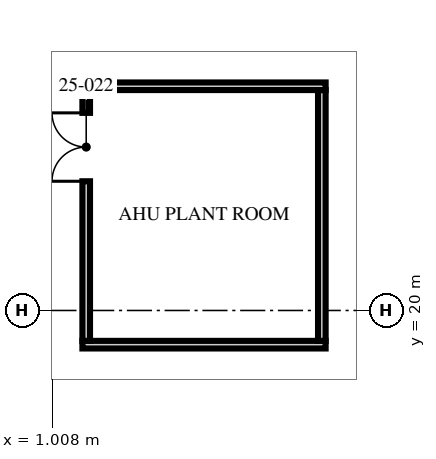
"""IFC4 building model, lengths in metres.
Left out: names, types, materials, properties, quantities, classifications, styles, units other than length and angle.
Written with IfcOpenShell. Run it as: python <this file> out.ifc"""

import sys

from ifc_helpers import new_model, si_unit, direction, frame, frame_2d, origin, origin_2d, place, context, subcontext, project, spatial, rectangle, hollow_rectangle, extrude, element, fill, save


model = new_model("IFC4")
c1 = context("Model", 3, precision=1e-05, world=origin(), true_north=direction((0.0, 1.0)))
c2 = subcontext(c1, "Body", "Model", "MODEL_VIEW")
j1 = project(units=[si_unit("LENGTHUNIT", "METRE"), si_unit("PLANEANGLEUNIT", "RADIAN")], contexts=[c1])
p1 = place(None, origin())
s1 = spatial("IfcSite", under=j1, at=p1, CompositionType="ELEMENT")
p2 = place(p1, origin())
s2 = spatial("IfcBuilding", under=s1, at=p2, CompositionType="ELEMENT")
p3 = place(p2, frame((0.0, 0.0, 99.75)))
s3 = spatial("IfcBuildingStorey", under=s2, at=p3, CompositionType="ELEMENT", Elevation=99.75)
p4 = place(p3, frame((0.0, 29.8, -0.65), z_axis=(0.0, -0.334765406017, 0.942301503201), x_axis=(1.0, 0.0, 0.0)))
e1 = element("IfcColumn", 1, at=p4, inside=s3, PredefinedType="COLUMN", context=c2, shape_type="SweptSolid", body=[
    extrude(hollow_rectangle(XDim=3.2, YDim=1.8, WallThickness=0.2, at=origin_2d()), origin(), (0.0, 0.0, 1.0), 8.065),
])
p5 = place(p3, frame((10.0, 29.8, -0.65), z_axis=(-0.103601510687, -0.332963994967, 0.937230870724), x_axis=(0.994618884766, -0.034712905596, 0.097612951251)))
e2 = element("IfcColumn", 2, at=p5, inside=s3, PredefinedType="COLUMN", context=c2, shape_type="SweptSolid", body=[
    extrude(hollow_rectangle(XDim=3.2, YDim=1.8, WallThickness=0.2, at=origin_2d()), origin(), (0.0, 0.0, 1.0), 8.109),
])
p6 = place(p3, frame((1.8, 19.1, 0.0), z_axis=(0.0, 0.0, 1.0), x_axis=(1.0, 0.0, 0.0)))
e3 = element("IfcWall", 3, at=p6, inside=s3, PredefinedType="SOLIDWALL", context=c2, shape_type="SweptSolid", body=[
    extrude(rectangle(XDim=6.4, YDim=0.2, at=frame_2d((3.2, 0.0))), origin(), (0.0, 0.0, 1.0), 6.46),
])
p7 = place(p3, frame((1.9, 19.2, 0.0), z_axis=(0.0, 0.0, 1.0), x_axis=(0.0, 1.0, 0.0)))
e4 = element("IfcWall", 4, at=p7, inside=s3, PredefinedType="SOLIDWALL", context=c2, shape_type="SweptSolid", body=[
    extrude(rectangle(XDim=6.6, YDim=0.2, at=frame_2d((3.3, 0.0))), origin(), (0.0, 0.0, 1.0), 7.25),
])
p8 = place(p7, frame((4.2, 0.0, 0.0)))
e5 = element("IfcOpeningElement", 5, at=p8, cuts=e4, PredefinedType="OPENING", context=c2, shape_type="SweptSolid", body=[
    extrude(rectangle(XDim=1.8, YDim=2.4, at=frame_2d((0.9, 1.2))), frame((0.0, 0.11, 0.0), z_axis=(0.0, -1.0, 0.0), x_axis=(1.0, 0.0, 0.0)), (0.0, 0.0, 1.0), 0.22),
])
p9 = place(p3, frame((8.1, 19.2, 0.0), z_axis=(0.0, 0.0, 1.0), x_axis=(0.0, 1.0, 0.0)))
e6 = element("IfcWall", 6, at=p9, inside=s3, PredefinedType="SOLIDWALL", context=c2, shape_type="SweptSolid", body=[
    extrude(rectangle(XDim=6.6, YDim=0.2, at=frame_2d((3.3, 0.0))), origin(), (0.0, 0.0, 1.0), 7.25),
])
p10 = place(p3, frame((1.8, 25.9, 0.0), z_axis=(0.0, 0.0, 1.0), x_axis=(1.0, 0.0, 0.0)))
e7 = element("IfcWall", 7, at=p10, inside=s3, PredefinedType="SOLIDWALL", context=c2, shape_type="SweptSolid", body=[
    extrude(rectangle(XDim=6.4, YDim=0.2, at=frame_2d((3.2, 0.0))), origin(), (0.0, 0.0, 1.0), 6.46),
])
p11 = place(p8, origin())
e8 = element("IfcDoor", 8, at=p11, inside=s3, OperationType="DOUBLE_DOOR_SINGLE_SWING", PredefinedType="DOOR", context=c2, shape_type="SweptSolid", body=[
    extrude(rectangle(XDim=1.8, YDim=2.4, at=frame_2d((0.9, 1.2))), frame((0.0, 0.025, 0.0), z_axis=(0.0, -1.0, 0.0), x_axis=(1.0, 0.0, 0.0)), (0.0, 0.0, 1.0), 0.05),
])
fill(e5, e8)
save(model, sys.argv[1])
